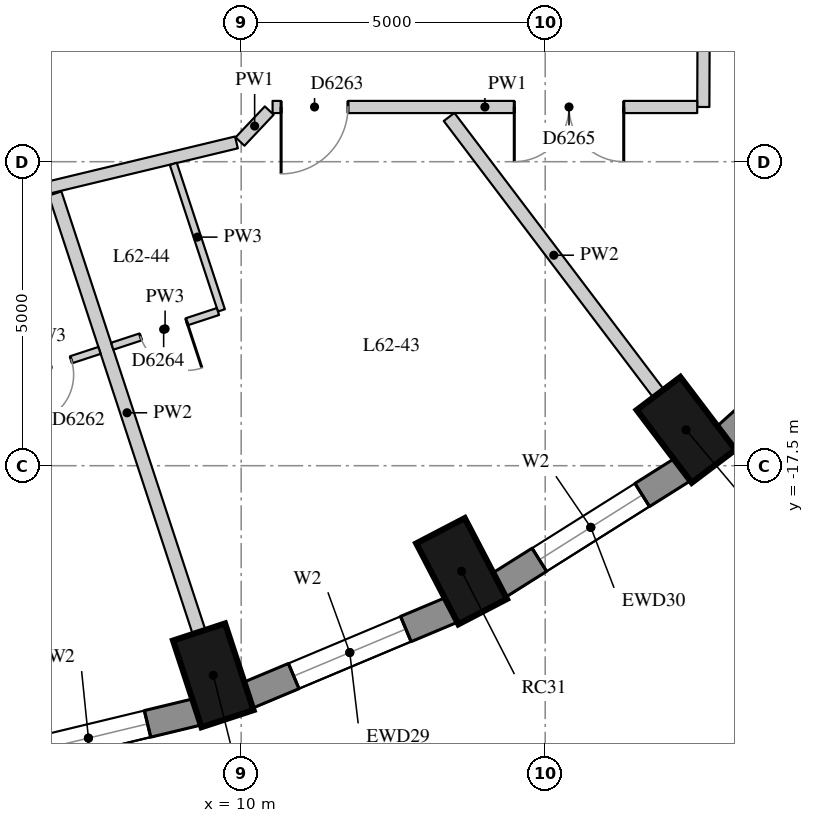
"""IFC4 building model, lengths in metres.
Left out: names, types, materials, properties, quantities, classifications, styles, units other than length and angle.
Written with IfcOpenShell. Run it as: python <this file> out.ifc"""

import sys

from ifc_helpers import new_model, si_unit, direction, frame, frame_2d, origin, origin_2d, place, context, subcontext, project, spatial, rectangle, extrude, element, fill, save


model = new_model("IFC4")
c1 = context("Model", 3, precision=1e-05, world=origin(), true_north=direction((0.0, 1.0)))
c2 = subcontext(c1, "Body", "Model", "MODEL_VIEW")
j1 = project(units=[si_unit("LENGTHUNIT", "METRE"), si_unit("PLANEANGLEUNIT", "RADIAN")], contexts=[c1])
p1 = place(None, origin())
s1 = spatial("IfcSite", under=j1, at=p1, CompositionType="ELEMENT")
p2 = place(p1, origin())
s2 = spatial("IfcBuilding", under=s1, at=p2, CompositionType="ELEMENT")
p3 = place(p2, frame((0.0, 0.0, 218.9)))
s3 = spatial("IfcBuildingStorey", under=s2, at=p3, CompositionType="ELEMENT", Elevation=218.9)
for number, where, z_axis, x_axis in (
    (1, (9.541, -20.948, 0.0), (0.0, 0.0, 1.0), (0.312, -0.95, 0.0)),
    (2, (13.625, -19.235, 0.0), (0.0, 0.0, 1.0), (0.462, -0.887, 0.0)),
    (3, (17.316, -16.911, 0.0), (0.0, 0.0, 1.0), (0.604, -0.797, 0.0)),
):
    element("IfcColumn", number, at=place(p3, frame(where, z_axis=z_axis, x_axis=x_axis)), inside=s3, PredefinedType="COLUMN", context=c2, shape_type="SweptSolid", body=[
        extrude(rectangle(XDim=1.5, YDim=0.9, at=origin_2d()), origin(), (0.0, 0.0, 1.0), 3.3),
    ])
p4 = place(p3, frame((5.691, -22.414, 0.0), z_axis=(0.0, 0.0, 1.0), x_axis=(0.9721584944, 0.234324266275, 0.0)))
e4 = element("IfcWall", 4, at=p4, inside=s3, PredefinedType="SOLIDWALL", context=c2, shape_type="SweptSolid", body=[
    extrude(rectangle(XDim=3.698, YDim=0.45, at=frame_2d((1.849, 0.0))), origin(), (0.0, 0.0, 1.0), 3.02),
])
p5 = place(p4, frame((0.849, 0.0, 0.4)))
e5 = element("IfcOpeningElement", 5, at=p5, cuts=e4, PredefinedType="OPENING", context=c2, shape_type="SweptSolid", body=[
    extrude(rectangle(XDim=2.0, YDim=1.75, at=frame_2d((1.0, 0.875))), frame((0.0, 0.235, 0.0), z_axis=(0.0, -1.0, 0.0), x_axis=(1.0, 0.0, 0.0)), (0.0, 0.0, 1.0), 0.47),
])
p6 = place(p3, frame((10.103, -21.279, 0.0), z_axis=(0.0, 0.0, 1.0), x_axis=(0.922168222612, 0.386789050006, 0.0)))
e6 = element("IfcWall", 6, at=p6, inside=s3, PredefinedType="SOLIDWALL", context=c2, shape_type="SweptSolid", body=[
    extrude(rectangle(XDim=3.651, YDim=0.45, at=frame_2d((1.825, 0.0))), origin(), (0.0, 0.0, 1.0), 3.02),
])
p7 = place(p6, frame((0.825, 0.0, 0.4)))
e7 = element("IfcOpeningElement", 7, at=p7, cuts=e6, PredefinedType="OPENING", context=c2, shape_type="SweptSolid", body=[
    extrude(rectangle(XDim=2.0, YDim=1.75, at=frame_2d((1.0, 0.875))), frame((0.0, 0.235, 0.0), z_axis=(0.0, -1.0, 0.0), x_axis=(1.0, 0.0, 0.0)), (0.0, 0.0, 1.0), 0.47),
])
p8 = place(p3, frame((14.232, -19.47, 0.0), z_axis=(0.0, 0.0, 1.0), x_axis=(0.84614984472, 0.532945063098, 0.0)))
e8 = element("IfcWall", 8, at=p8, inside=s3, PredefinedType="SOLIDWALL", context=c2, shape_type="SweptSolid", body=[
    extrude(rectangle(XDim=3.586, YDim=0.45, at=frame_2d((1.793, 0.0))), origin(), (0.0, 0.0, 1.0), 3.02),
])
p9 = place(p8, frame((0.793, 0.0, 0.4)))
e9 = element("IfcOpeningElement", 9, at=p9, cuts=e8, PredefinedType="OPENING", context=c2, shape_type="SweptSolid", body=[
    extrude(rectangle(XDim=2.0, YDim=1.75, at=frame_2d((1.0, 0.875))), frame((0.0, 0.235, 0.0), z_axis=(0.0, -1.0, 0.0), x_axis=(1.0, 0.0, 0.0)), (0.0, 0.0, 1.0), 0.47),
])
p10 = place(p3, frame((17.953, -17.04, 0.0), z_axis=(0.0, 0.0, 1.0), x_axis=(0.743442727602, 0.668799604348, 0.0)))
e10 = element("IfcWall", 10, at=p10, inside=s3, PredefinedType="SOLIDWALL", context=c2, shape_type="SweptSolid", body=[
    extrude(rectangle(XDim=3.513, YDim=0.45, at=frame_2d((1.756, 0.0))), origin(), (0.0, 0.0, 1.0), 3.02),
])
p11 = place(p3, frame((17.63, -4.043, 0.0), z_axis=(0.0, 0.0, 1.0), x_axis=(-0.003908870153, -0.999992360338, 0.0)))
e11 = element("IfcWall", 11, at=p11, inside=s3, PredefinedType="PARTITIONING", context=c2, shape_type="SweptSolid", body=[
    extrude(rectangle(XDim=7.557, YDim=0.2, at=frame_2d((3.779, 0.0))), origin(), (0.0, 0.0, 1.0), 3.02),
])
p12 = place(p3, frame((17.5, -11.6, 0.0), z_axis=(0.0, 0.0, 1.0), x_axis=(-1.0, 0.0, 0.0)))
e12 = element("IfcWall", 12, at=p12, inside=s3, PredefinedType="PARTITIONING", context=c2, shape_type="SweptSolid", body=[
    extrude(rectangle(XDim=6.983, YDim=0.2, at=frame_2d((3.492, 0.0))), origin(), (0.0, 0.0, 1.0), 3.02),
])
p13 = place(p12, frame((5.743, 0.0, 0.0)))
e13 = element("IfcOpeningElement", 13, at=p13, cuts=e12, PredefinedType="OPENING", context=c2, shape_type="SweptSolid", body=[
    extrude(rectangle(XDim=1.1, YDim=2.1, at=frame_2d((0.55, 1.05))), frame((0.0, 0.11, 0.0), z_axis=(0.0, -1.0, 0.0), x_axis=(1.0, 0.0, 0.0)), (0.0, 0.0, 1.0), 0.22),
])
p14 = place(p12, frame((1.208, 0.0, 0.0)))
e14 = element("IfcOpeningElement", 14, at=p14, cuts=e12, PredefinedType="OPENING", context=c2, shape_type="SweptSolid", body=[
    extrude(rectangle(XDim=1.8, YDim=2.1, at=frame_2d((0.9, 1.05))), frame((0.0, 0.11, 0.0), z_axis=(0.0, -1.0, 0.0), x_axis=(1.0, 0.0, 0.0)), (0.0, 0.0, 1.0), 0.22),
])
p15 = place(p3, frame((10.462, -11.659, 0.0), z_axis=(0.0, 0.0, 1.0), x_axis=(-0.686265612426, -0.727351021998, 0.0)))
e15 = element("IfcWall", 15, at=p15, inside=s3, PredefinedType="PARTITIONING", context=c2, shape_type="SweptSolid", body=[
    extrude(rectangle(XDim=0.701, YDim=0.2, at=frame_2d((0.351, 0.0))), origin(), (0.0, 0.0, 1.0), 3.02),
])
p16 = place(p3, frame((9.922, -12.183, 0.0), z_axis=(0.0, 0.0, 1.0), x_axis=(-0.972292362394, -0.233768180104, 0.0)))
e16 = element("IfcWall", 16, at=p16, inside=s3, PredefinedType="PARTITIONING", context=c2, shape_type="SweptSolid", body=[
    extrude(rectangle(XDim=9.485, YDim=0.2, at=frame_2d((4.742, 0.0))), origin(), (0.0, 0.0, 1.0), 2.42),
])
p17 = place(p16, frame((8.245, 0.0, 0.0)))
e17 = element("IfcOpeningElement", 17, at=p17, cuts=e16, PredefinedType="OPENING", context=c2, shape_type="SweptSolid", body=[
    extrude(rectangle(XDim=1.1, YDim=2.1, at=frame_2d((0.55, 1.05))), frame((0.0, 0.11, 0.0), z_axis=(0.0, -1.0, 0.0), x_axis=(1.0, 0.0, 0.0)), (0.0, 0.0, 1.0), 0.22),
])
p18 = place(p3, frame((9.307, -20.235, 0.0), z_axis=(0.0, 0.0, 1.0), x_axis=(-0.311979110549, 0.950088961404, 0.0)))
e18 = element("IfcWall", 18, at=p18, inside=s3, PredefinedType="PARTITIONING", context=c2, shape_type="SweptSolid", body=[
    extrude(rectangle(XDim=7.591, YDim=0.22, at=frame_2d((3.795, 0.0))), origin(), (0.0, 0.0, 1.0), 3.02),
])
p19 = place(p3, frame((16.863, -16.312, 0.0), z_axis=(0.0, 0.0, 1.0), x_axis=(-0.603636051313, 0.797260006243, 0.0)))
e19 = element("IfcWall", 19, at=p19, inside=s3, PredefinedType="PARTITIONING", context=c2, shape_type="SweptSolid", body=[
    extrude(rectangle(XDim=5.706, YDim=0.22, at=frame_2d((2.853, 0.0))), origin(), (0.0, 0.0, 1.0), 3.02),
])
p20 = place(p3, frame((8.884, -12.535, 0.0), z_axis=(0.0, 0.0, 1.0), x_axis=(0.312037873477, -0.950069663507, 0.0)))
e20 = element("IfcWall", 20, at=p20, inside=s3, PredefinedType="PARTITIONING", context=c2, shape_type="SweptSolid", body=[
    extrude(rectangle(XDim=2.537, YDim=0.12, at=frame_2d((1.268, 0.0))), origin(), (0.0, 0.0, 1.0), 3.02),
])
p21 = place(p3, frame((5.932, -16.174, 0.0), z_axis=(0.0, 0.0, 1.0), x_axis=(0.950140787885, 0.311821235962, 0.0)))
e21 = element("IfcWall", 21, at=p21, inside=s3, PredefinedType="PARTITIONING", context=c2, shape_type="SweptSolid", body=[
    extrude(rectangle(XDim=1.83, YDim=0.12, at=frame_2d((0.915, 0.0))), origin(), (0.0, 0.0, 1.0), 3.02),
])
p22 = place(p21, frame((0.54, 0.0, 0.0)))
e22 = element("IfcOpeningElement", 22, at=p22, cuts=e21, PredefinedType="OPENING", context=c2, shape_type="SweptSolid", body=[
    extrude(rectangle(XDim=0.8, YDim=2.1, at=frame_2d((0.4, 1.05))), frame((0.0, 0.07, 0.0), z_axis=(0.0, -1.0, 0.0), x_axis=(1.0, 0.0, 0.0)), (0.0, 0.0, 1.0), 0.14),
])
p23 = place(p3, frame((9.618, -14.964, 0.0), z_axis=(0.0, 0.0, 1.0), x_axis=(-0.950140787885, -0.311821235962, 0.0)))
e23 = element("IfcWall", 23, at=p23, inside=s3, PredefinedType="PARTITIONING", context=c2, shape_type="SweptSolid", body=[
    extrude(rectangle(XDim=1.83, YDim=0.12, at=frame_2d((0.915, 0.0))), origin(), (0.0, 0.0, 1.0), 3.02),
])
p24 = place(p23, frame((0.54, 0.0, 0.0)))
e24 = element("IfcOpeningElement", 24, at=p24, cuts=e23, PredefinedType="OPENING", context=c2, shape_type="SweptSolid", body=[
    extrude(rectangle(XDim=0.8, YDim=2.1, at=frame_2d((0.4, 1.05))), frame((0.0, 0.07, 0.0), z_axis=(0.0, -1.0, 0.0), x_axis=(1.0, 0.0, 0.0)), (0.0, 0.0, 1.0), 0.14),
])
p25 = place(p5, origin())
e25 = element("IfcWindow", 25, at=p25, inside=s3, PartitioningType="SINGLE_PANEL", PredefinedType="WINDOW", context=c2, shape_type="SweptSolid", body=[
    extrude(rectangle(XDim=2.0, YDim=1.75, at=frame_2d((1.0, 0.875))), frame((0.0, 0.035, 0.0), z_axis=(0.0, -1.0, 0.0), x_axis=(1.0, 0.0, 0.0)), (0.0, 0.0, 1.0), 0.06),
])
fill(e5, e25)
p26 = place(p7, origin())
e26 = element("IfcWindow", 26, at=p26, inside=s3, PartitioningType="SINGLE_PANEL", PredefinedType="WINDOW", context=c2, shape_type="SweptSolid", body=[
    extrude(rectangle(XDim=2.0, YDim=1.75, at=frame_2d((1.0, 0.875))), frame((0.0, 0.035, 0.0), z_axis=(0.0, -1.0, 0.0), x_axis=(1.0, 0.0, 0.0)), (0.0, 0.0, 1.0), 0.06),
])
fill(e7, e26)
p27 = place(p9, origin())
e27 = element("IfcWindow", 27, at=p27, inside=s3, PartitioningType="SINGLE_PANEL", PredefinedType="WINDOW", context=c2, shape_type="SweptSolid", body=[
    extrude(rectangle(XDim=2.0, YDim=1.75, at=frame_2d((1.0, 0.875))), frame((0.0, 0.035, 0.0), z_axis=(0.0, -1.0, 0.0), x_axis=(1.0, 0.0, 0.0)), (0.0, 0.0, 1.0), 0.06),
])
fill(e9, e27)
p28 = place(p22, origin())
e28 = element("IfcDoor", 28, at=p28, inside=s3, OperationType="SINGLE_SWING_RIGHT", PredefinedType="DOOR", context=c2, shape_type="SweptSolid", body=[
    extrude(rectangle(XDim=0.8, YDim=2.1, at=frame_2d((0.4, 1.05))), frame((0.0, 0.025, 0.0), z_axis=(0.0, -1.0, 0.0), x_axis=(1.0, 0.0, 0.0)), (0.0, 0.0, 1.0), 0.05),
])
fill(e22, e28)
p29 = place(p13, origin())
e29 = element("IfcDoor", 29, at=p29, inside=s3, OperationType="SINGLE_SWING_RIGHT", PredefinedType="DOOR", context=c2, shape_type="SweptSolid", body=[
    extrude(rectangle(XDim=1.1, YDim=2.1, at=frame_2d((0.55, 1.05))), frame((0.0, 0.025, 0.0), z_axis=(0.0, -1.0, 0.0), x_axis=(1.0, 0.0, 0.0)), (0.0, 0.0, 1.0), 0.05),
])
fill(e13, e29)
p30 = place(p24, origin())
e30 = element("IfcDoor", 30, at=p30, inside=s3, OperationType="SINGLE_SWING_LEFT", PredefinedType="DOOR", context=c2, shape_type="SweptSolid", body=[
    extrude(rectangle(XDim=0.8, YDim=2.1, at=frame_2d((0.4, 1.05))), frame((0.0, 0.025, 0.0), z_axis=(0.0, -1.0, 0.0), x_axis=(1.0, 0.0, 0.0)), (0.0, 0.0, 1.0), 0.05),
])
fill(e24, e30)
p31 = place(p14, origin())
e31 = element("IfcDoor", 31, at=p31, inside=s3, OperationType="DOUBLE_DOOR_SINGLE_SWING", PredefinedType="DOOR", context=c2, shape_type="SweptSolid", body=[
    extrude(rectangle(XDim=1.8, YDim=2.1, at=frame_2d((0.9, 1.05))), frame((0.0, 0.025, 0.0), z_axis=(0.0, -1.0, 0.0), x_axis=(1.0, 0.0, 0.0)), (0.0, 0.0, 1.0), 0.05),
])
fill(e14, e31)
save(model, sys.argv[1])
